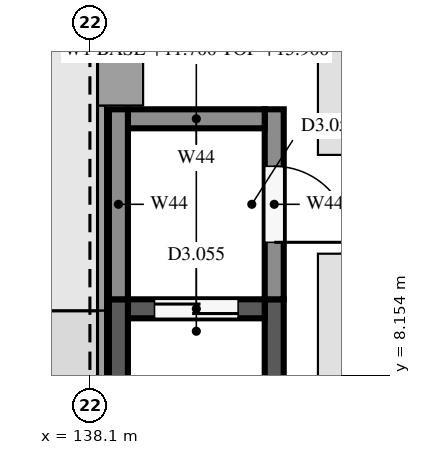
"""IFC4 building model, lengths in metres.
Left out: names, types, materials, properties, quantities, classifications, styles, units other than length and angle.
Written with IfcOpenShell. Run it as: python <this file> out.ifc"""

import sys

from ifc_helpers import new_model, si_unit, direction, frame, frame_2d, origin, place, context, subcontext, project, spatial, rectangle, extrude, element, fill, save


model = new_model("IFC4")
c1 = context("Model", 3, precision=1e-05, world=origin(), true_north=direction((0.0, 1.0)))
c2 = subcontext(c1, "Body", "Model", "MODEL_VIEW")
j1 = project(units=[si_unit("LENGTHUNIT", "METRE"), si_unit("PLANEANGLEUNIT", "RADIAN")], contexts=[c1])
p1 = place(None, origin())
s1 = spatial("IfcSite", under=j1, at=p1, CompositionType="ELEMENT")
p2 = place(p1, origin())
s2 = spatial("IfcBuilding", under=s1, at=p2, CompositionType="ELEMENT")
p3 = place(p2, frame((0.0, 0.0, 11.7)))
s3 = spatial("IfcBuildingStorey", under=s2, at=p3, CompositionType="ELEMENT", Elevation=11.7)
for number, where, z_axis, x_axis in (
    (1, (138.475, 6.25, 0.0), (0.0, 0.0, 1.0), (0.0, 1.0, 0.0)),
    (2, (140.525, 6.25, 0.0), (0.0, 0.0, 1.0), (0.0, 1.0, 0.0)),
):
    element("IfcWall", number, at=place(p3, frame(where, z_axis=z_axis, x_axis=x_axis)), inside=s3, PredefinedType="SHEAR", context=c2, shape_type="SweptSolid", body=[
        extrude(rectangle(XDim=2.9, YDim=0.25, at=frame_2d((1.45, 0.0))), origin(), (0.0, 0.0, 1.0), 4.2),
    ])
p4 = place(p3, frame((138.6, 9.025, 0.0), z_axis=(0.0, 0.0, 1.0), x_axis=(1.0, 0.0, 0.0)))
e3 = element("IfcWall", 3, at=p4, inside=s3, PredefinedType="SHEAR", context=c2, shape_type="SweptSolid", body=[
    extrude(rectangle(XDim=1.8, YDim=0.25, at=frame_2d((0.9, 0.0))), origin(), (0.0, 0.0, 1.0), 4.2),
])
p5 = place(p4, frame((0.35, 0.0, 0.0)))
e4 = element("IfcOpeningElement", 4, at=p5, cuts=e3, PredefinedType="OPENING", context=c2, shape_type="SweptSolid", body=[
    extrude(rectangle(XDim=1.1, YDim=2.1, at=frame_2d((0.55, 1.05))), frame((0.0, 0.135, 0.0), z_axis=(0.0, -1.0, 0.0), x_axis=(1.0, 0.0, 0.0)), (0.0, 0.0, 1.0), 0.27),
])
p6 = place(p3, frame((138.475, 9.15, 0.0), z_axis=(0.0, 0.0, 1.0), x_axis=(0.0, 1.0, 0.0)))
e5 = element("IfcWall", 5, at=p6, inside=s3, PredefinedType="SOLIDWALL", context=c2, shape_type="SweptSolid", body=[
    extrude(rectangle(XDim=2.5, YDim=0.25, at=frame_2d((1.25, 0.0))), origin(), (0.0, 0.0, 1.0), 4.2),
])
p7 = place(p3, frame((140.525, 11.65, 0.0), z_axis=(0.0, 0.0, 1.0), x_axis=(0.0, -1.0, 0.0)))
e6 = element("IfcWall", 6, at=p7, inside=s3, PredefinedType="SOLIDWALL", context=c2, shape_type="SweptSolid", body=[
    extrude(rectangle(XDim=2.5, YDim=0.25, at=frame_2d((1.25, 0.0))), origin(), (0.0, 0.0, 1.0), 4.2),
])
p8 = place(p7, frame((0.75, 0.0, 0.0)))
e7 = element("IfcOpeningElement", 7, at=p8, cuts=e6, PredefinedType="OPENING", context=c2, shape_type="SweptSolid", body=[
    extrude(rectangle(XDim=1.0, YDim=2.1, at=frame_2d((0.5, 1.05))), frame((0.0, 0.135, 0.0), z_axis=(0.0, -1.0, 0.0), x_axis=(1.0, 0.0, 0.0)), (0.0, 0.0, 1.0), 0.27),
])
p9 = place(p3, frame((138.6, 11.525, 0.0), z_axis=(0.0, 0.0, 1.0), x_axis=(1.0, 0.0, 0.0)))
e8 = element("IfcWall", 8, at=p9, inside=s3, PredefinedType="SOLIDWALL", context=c2, shape_type="SweptSolid", body=[
    extrude(rectangle(XDim=1.8, YDim=0.25, at=frame_2d((0.9, 0.0))), origin(), (0.0, 0.0, 1.0), 4.2),
])
p10 = place(p8, origin())
e9 = element("IfcDoor", 9, at=p10, inside=s3, OperationType="SINGLE_SWING_RIGHT", PredefinedType="DOOR", context=c2, shape_type="SweptSolid", body=[
    extrude(rectangle(XDim=1.0, YDim=2.1, at=frame_2d((0.5, 1.05))), frame((0.0, 0.025, 0.0), z_axis=(0.0, -1.0, 0.0), x_axis=(1.0, 0.0, 0.0)), (0.0, 0.0, 1.0), 0.05),
])
fill(e7, e9)
p11 = place(p5, origin())
e10 = element("IfcDoor", 10, at=p11, inside=s3, OperationType="SLIDING_TO_LEFT", PredefinedType="DOOR", context=c2, shape_type="SweptSolid", body=[
    extrude(rectangle(XDim=1.1, YDim=2.1, at=frame_2d((0.55, 1.05))), frame((0.0, 0.025, 0.0), z_axis=(0.0, -1.0, 0.0), x_axis=(1.0, 0.0, 0.0)), (0.0, 0.0, 1.0), 0.05),
])
fill(e4, e10)
save(model, sys.argv[1])
